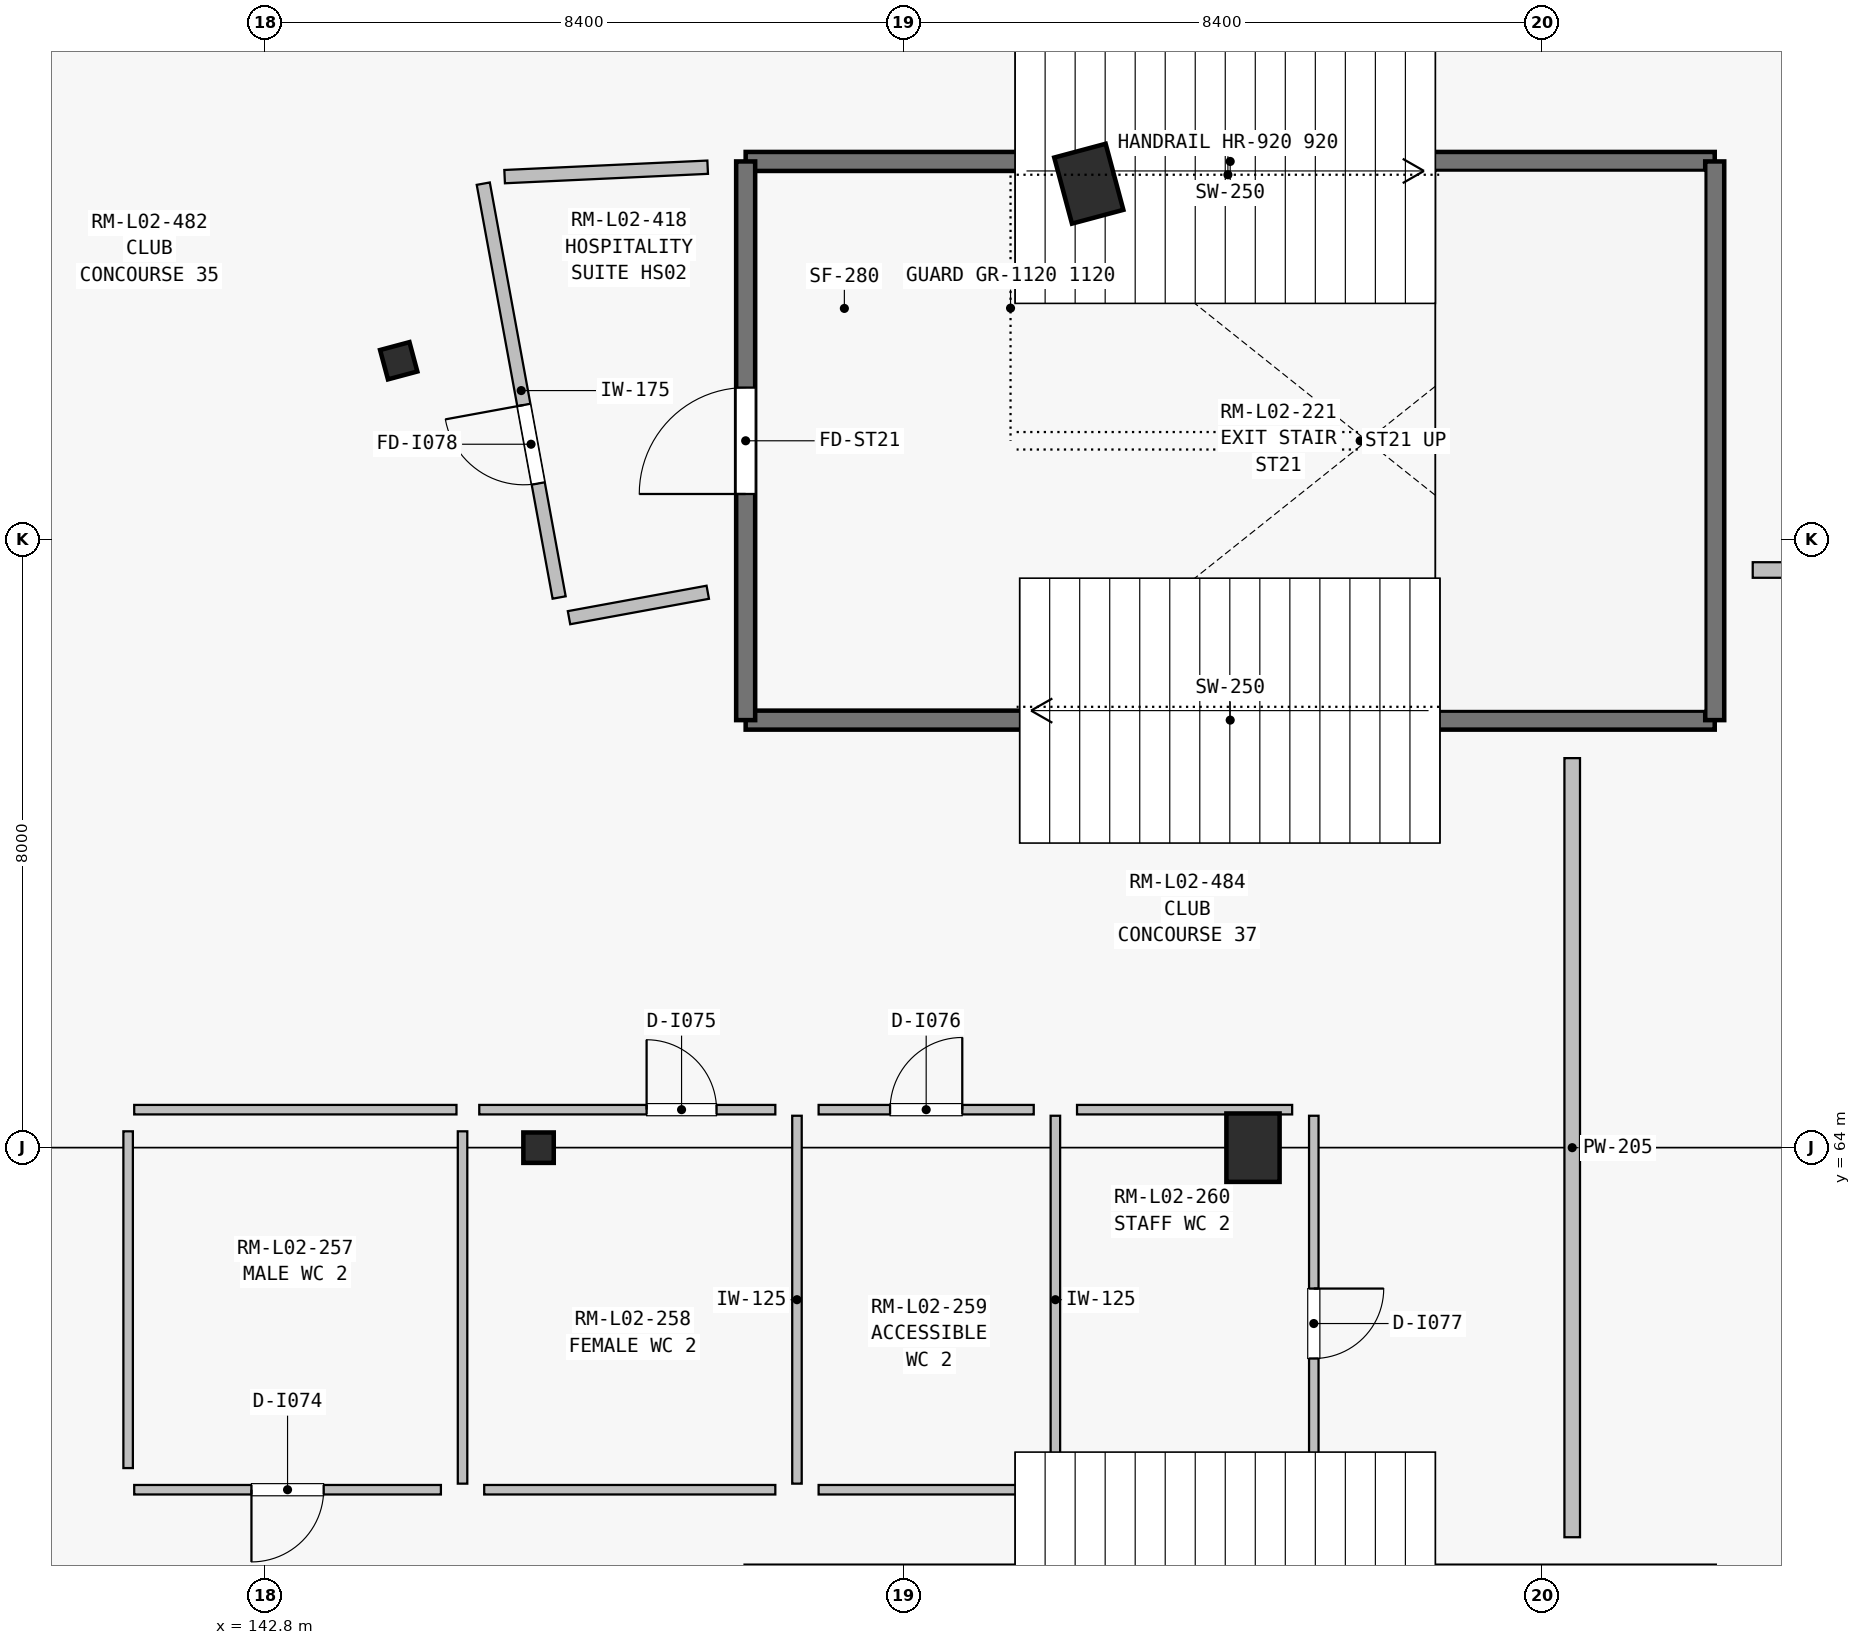
"""IFC4 building model, lengths in metres.
Left out: names, types, materials, properties, quantities, classifications, styles, units other than length and angle.
Written with IfcOpenShell. Run it as: python <this file> out.ifc"""

import sys

from ifc_helpers import new_model, si_unit, direction, frame, frame_2d, origin, origin_2d, place, context, subcontext, project, spatial, rectangle, i_section, extrude, element, fill, save


model = new_model("IFC4")
c1 = context("Model", 3, precision=1e-05, world=origin(), true_north=direction((0.0, 1.0)))
c2 = subcontext(c1, "Body", "Model", "MODEL_VIEW")
j1 = project(units=[si_unit("LENGTHUNIT", "METRE"), si_unit("PLANEANGLEUNIT", "RADIAN")], contexts=[c1])
p1 = place(None, origin())
s1 = spatial("IfcSite", under=j1, at=p1, CompositionType="ELEMENT")
p2 = place(p1, origin())
s2 = spatial("IfcBuilding", under=s1, at=p2, CompositionType="ELEMENT")
p3 = place(p2, frame((0.0, 0.0, 9.9)))
s3 = spatial("IfcBuildingStorey", under=s2, at=p3, CompositionType="ELEMENT", Elevation=9.9)
for number, where, z_axis, x_axis in (
    (1, (146.4, 64.0, 0.0), (0.0, 0.0, 1.0), (1.0, 0.0, 0.0)),
    (2, (144.56, 74.353, 0.0), (0.0, 0.0, 1.0), (0.966, 0.259, 0.0)),
):
    element("IfcColumn", number, at=place(p3, frame(where, z_axis=z_axis, x_axis=x_axis)), inside=s3, PredefinedType="COLUMN", context=c2, shape_type="SweptSolid", body=[
        extrude(i_section(OverallWidth=0.4, OverallDepth=0.4, WebThickness=0.018, FlangeThickness=0.032, at=origin_2d()), origin(), (0.0, 0.0, 1.0), 4.5),
    ])
for number, where, z_axis, x_axis in (
    (3, (155.8, 64.0, 0.0), (0.0, 0.0, 1.0), (1.0, 0.0, 0.0)),
    (4, (153.64, 76.682, 0.0), (0.0, 0.0, 1.0), (0.966, 0.259, 0.0)),
):
    element("IfcColumn", number, at=place(p3, frame(where, z_axis=z_axis, x_axis=x_axis)), inside=s3, PredefinedType="COLUMN", context=c2, shape_type="SweptSolid", body=[
        extrude(rectangle(XDim=0.7, YDim=0.9, at=origin_2d()), origin(), (0.0, 0.0, 1.0), 4.5),
    ])
for number, where, z_axis, x_axis in (
    (5, (149.125, 69.625, 0.0), (0.0, 0.0, 1.0), (1.0, 0.0, 0.0)),
    (6, (149.125, 76.975, 0.0), (0.0, 0.0, 1.0), (1.0, 0.0, 0.0)),
):
    element("IfcWall", number, at=place(p3, frame(where, z_axis=z_axis, x_axis=x_axis)), inside=s3, PredefinedType="SHEAR", context=c2, shape_type="SweptSolid", body=[
        extrude(rectangle(XDim=12.75, YDim=0.25, at=frame_2d((6.375, 0.0))), origin(), (0.0, 0.0, 1.0), 4.5),
    ])
p4 = place(p3, frame((149.125, 69.625, 0.0), z_axis=(0.0, 0.0, 1.0), x_axis=(0.0, 1.0, 0.0)))
e7 = element("IfcWall", 7, at=p4, inside=s3, PredefinedType="SHEAR", context=c2, shape_type="SweptSolid", body=[
    extrude(rectangle(XDim=7.35, YDim=0.25, at=frame_2d((3.675, 0.0))), origin(), (0.0, 0.0, 1.0), 4.5),
])
p5 = place(p4, frame((2.975, 0.0, 0.0)))
e8 = element("IfcOpeningElement", 8, at=p5, cuts=e7, PredefinedType="OPENING", context=c2, shape_type="SweptSolid", body=[
    extrude(rectangle(XDim=1.4, YDim=2.2, at=frame_2d((0.7, 1.1))), frame((0.0, 0.135, 0.0), z_axis=(0.0, -1.0, 0.0), x_axis=(1.0, 0.0, 0.0)), (0.0, 0.0, 1.0), 0.27),
])
p6 = place(p3, frame((161.875, 69.625, 0.0), z_axis=(0.0, 0.0, 1.0), x_axis=(0.0, 1.0, 0.0)))
e9 = element("IfcWall", 9, at=p6, inside=s3, PredefinedType="SHEAR", context=c2, shape_type="SweptSolid", body=[
    extrude(rectangle(XDim=7.35, YDim=0.25, at=frame_2d((3.675, 0.0))), origin(), (0.0, 0.0, 1.0), 4.5),
])
p7 = place(p3, frame((141.08, 64.5, 0.0), z_axis=(0.0, 0.0, 1.0), x_axis=(1.0, 0.0, 0.0)))
e10 = element("IfcWall", 10, at=p7, inside=s3, PredefinedType="PARTITIONING", context=c2, shape_type="SweptSolid", body=[
    extrude(rectangle(XDim=4.24, YDim=0.125, at=frame_2d((2.12, 0.0))), origin(), (0.0, 0.0, 1.0), 4.2),
])
p8 = place(p3, frame((145.4, 64.215, 0.0), z_axis=(0.0, 0.0, 1.0), x_axis=(0.0, -1.0, 0.0)))
e11 = element("IfcWall", 11, at=p8, inside=s3, PredefinedType="PARTITIONING", context=c2, shape_type="SweptSolid", body=[
    extrude(rectangle(XDim=4.635, YDim=0.125, at=frame_2d((2.317, 0.0))), origin(), (0.0, 0.0, 1.0), 3.245),
])
p9 = place(p3, frame((145.115, 59.5, 0.0), z_axis=(0.0, 0.0, 1.0), x_axis=(-1.0, 0.0, 0.0)))
e12 = element("IfcWall", 12, at=p9, inside=s3, PredefinedType="PARTITIONING", context=c2, shape_type="SweptSolid", body=[
    extrude(rectangle(XDim=4.035, YDim=0.125, at=frame_2d((2.018, 0.0))), origin(), (0.0, 0.0, 1.0), 4.18),
])
p10 = place(p9, frame((1.542, 0.0, 0.0)))
e13 = element("IfcOpeningElement", 13, at=p10, cuts=e12, PredefinedType="OPENING", context=c2, shape_type="SweptSolid", body=[
    extrude(rectangle(XDim=0.95, YDim=2.1, at=frame_2d((0.475, 1.05))), frame((0.0, 0.073, 0.0), z_axis=(0.0, -1.0, 0.0), x_axis=(1.0, 0.0, 0.0)), (0.0, 0.0, 1.0), 0.145),
])
p11 = place(p3, frame((141.0, 59.785, 0.0), z_axis=(0.0, 0.0, 1.0), x_axis=(0.0, 1.0, 0.0)))
e14 = element("IfcWall", 14, at=p11, inside=s3, PredefinedType="PARTITIONING", context=c2, shape_type="SweptSolid", body=[
    extrude(rectangle(XDim=4.43, YDim=0.125, at=frame_2d((2.215, 0.0))), origin(), (0.0, 0.0, 1.0), 4.18),
])
p12 = place(p3, frame((149.8, 64.42, 0.0), z_axis=(0.0, 0.0, 1.0), x_axis=(0.0, -1.0, 0.0)))
e15 = element("IfcWall", 15, at=p12, inside=s3, PredefinedType="PARTITIONING", context=c2, shape_type="SweptSolid", body=[
    extrude(rectangle(XDim=4.84, YDim=0.125, at=frame_2d((2.42, 0.0))), origin(), (0.0, 0.0, 1.0), 3.627),
])
p13 = place(p3, frame((149.515, 59.5, 0.0), z_axis=(0.0, 0.0, 1.0), x_axis=(-1.0, 0.0, 0.0)))
e16 = element("IfcWall", 16, at=p13, inside=s3, PredefinedType="PARTITIONING", context=c2, shape_type="SweptSolid", body=[
    extrude(rectangle(XDim=3.83, YDim=0.125, at=frame_2d((1.915, 0.0))), origin(), (0.0, 0.0, 1.0), 3.245),
])
p14 = place(p3, frame((145.62, 64.5, 0.0), z_axis=(0.0, 0.0, 1.0), x_axis=(1.0, 0.0, 0.0)))
e17 = element("IfcWall", 17, at=p14, inside=s3, PredefinedType="PARTITIONING", context=c2, shape_type="SweptSolid", body=[
    extrude(rectangle(XDim=3.895, YDim=0.125, at=frame_2d((1.948, 0.0))), origin(), (0.0, 0.0, 1.0), 3.245),
])
p15 = place(p14, frame((2.202, 0.0, 0.0)))
e18 = element("IfcOpeningElement", 18, at=p15, cuts=e17, PredefinedType="OPENING", context=c2, shape_type="SweptSolid", body=[
    extrude(rectangle(XDim=0.92, YDim=2.1, at=frame_2d((0.46, 1.05))), frame((0.0, 0.073, 0.0), z_axis=(0.0, -1.0, 0.0), x_axis=(1.0, 0.0, 0.0)), (0.0, 0.0, 1.0), 0.145),
])
p16 = place(p3, frame((153.2, 64.42, 0.0), z_axis=(0.0, 0.0, 1.0), x_axis=(0.0, -1.0, 0.0)))
e19 = element("IfcWall", 19, at=p16, inside=s3, PredefinedType="PARTITIONING", context=c2, shape_type="SweptSolid", body=[
    extrude(rectangle(XDim=4.84, YDim=0.125, at=frame_2d((2.42, 0.0))), origin(), (0.0, 0.0, 1.0), 3.627),
])
p17 = place(p3, frame((152.915, 59.5, 0.0), z_axis=(0.0, 0.0, 1.0), x_axis=(-1.0, 0.0, 0.0)))
e20 = element("IfcWall", 20, at=p17, inside=s3, PredefinedType="PARTITIONING", context=c2, shape_type="SweptSolid", body=[
    extrude(rectangle(XDim=2.831, YDim=0.125, at=frame_2d((1.415, 0.0))), origin(), (0.0, 0.0, 1.0), 4.18),
])
p18 = place(p3, frame((150.085, 64.5, 0.0), z_axis=(0.0, 0.0, 1.0), x_axis=(1.0, 0.0, 0.0)))
e21 = element("IfcWall", 21, at=p18, inside=s3, PredefinedType="PARTITIONING", context=c2, shape_type="SweptSolid", body=[
    extrude(rectangle(XDim=2.831, YDim=0.125, at=frame_2d((1.415, 0.0))), origin(), (0.0, 0.0, 1.0), 4.2),
])
p19 = place(p18, frame((0.94, 0.0, 0.0)))
e22 = element("IfcOpeningElement", 22, at=p19, cuts=e21, PredefinedType="OPENING", context=c2, shape_type="SweptSolid", body=[
    extrude(rectangle(XDim=0.95, YDim=2.1, at=frame_2d((0.475, 1.05))), frame((0.0, 0.073, 0.0), z_axis=(0.0, -1.0, 0.0), x_axis=(1.0, 0.0, 0.0)), (0.0, 0.0, 1.0), 0.145),
])
p20 = place(p3, frame((156.6, 64.42, 0.0), z_axis=(0.0, 0.0, 1.0), x_axis=(0.0, -1.0, 0.0)))
e23 = element("IfcWall", 23, at=p20, inside=s3, PredefinedType="PARTITIONING", context=c2, shape_type="SweptSolid", body=[
    extrude(rectangle(XDim=4.84, YDim=0.125, at=frame_2d((2.42, 0.0))), origin(), (0.0, 0.0, 1.0), 3.627),
])
p21 = place(p20, frame((2.274, 0.0, 0.0)))
e24 = element("IfcOpeningElement", 24, at=p21, cuts=e23, PredefinedType="OPENING", context=c2, shape_type="SweptSolid", body=[
    extrude(rectangle(XDim=0.92, YDim=2.1, at=frame_2d((0.46, 1.05))), frame((0.0, 0.073, 0.0), z_axis=(0.0, -1.0, 0.0), x_axis=(1.0, 0.0, 0.0)), (0.0, 0.0, 1.0), 0.145),
])
p22 = place(p3, frame((156.315, 59.5, 0.0), z_axis=(0.0, 0.0, 1.0), x_axis=(-1.0, 0.0, 0.0)))
e25 = element("IfcWall", 25, at=p22, inside=s3, PredefinedType="PARTITIONING", context=c2, shape_type="SweptSolid", body=[
    extrude(rectangle(XDim=2.83, YDim=0.125, at=frame_2d((1.415, 0.0))), origin(), (0.0, 0.0, 1.0), 4.18),
])
p23 = place(p3, frame((153.485, 64.5, 0.0), z_axis=(0.0, 0.0, 1.0), x_axis=(1.0, 0.0, 0.0)))
e26 = element("IfcWall", 26, at=p23, inside=s3, PredefinedType="PARTITIONING", context=c2, shape_type="SweptSolid", body=[
    extrude(rectangle(XDim=2.83, YDim=0.125, at=frame_2d((1.415, 0.0))), origin(), (0.0, 0.0, 1.0), 4.2),
])
p24 = place(p3, frame((148.626, 71.307, 0.0), z_axis=(0.0, 0.0, 1.0), x_axis=(-0.983601501443, -0.180355444494, 0.0)))
e27 = element("IfcWall", 27, at=p24, inside=s3, PredefinedType="PARTITIONING", context=c2, shape_type="SweptSolid", body=[
    extrude(rectangle(XDim=1.856, YDim=0.175, at=frame_2d((0.928, 0.0))), origin(), (0.0, 0.0, 1.0), 4.2),
])
p25 = place(p3, frame((146.671, 71.238, 0.0), z_axis=(0.0, 0.0, 1.0), x_axis=(-0.180348493387, 0.983602775989, 0.0)))
e28 = element("IfcWall", 28, at=p25, inside=s3, PredefinedType="PARTITIONING", context=c2, shape_type="SweptSolid", body=[
    extrude(rectangle(XDim=5.535, YDim=0.175, at=frame_2d((2.768, 0.0))), origin(), (0.0, 0.0, 1.0), 4.2),
])
p26 = place(p25, frame((1.525, 0.0, 0.0)))
e29 = element("IfcOpeningElement", 29, at=p26, cuts=e28, PredefinedType="OPENING", context=c2, shape_type="SweptSolid", body=[
    extrude(rectangle(XDim=1.05, YDim=2.25, at=frame_2d((0.525, 1.125))), frame((0.0, 0.097, 0.0), z_axis=(0.0, -1.0, 0.0), x_axis=(1.0, 0.0, 0.0)), (0.0, 0.0, 1.0), 0.195),
])
p27 = place(p3, frame((145.954, 76.775, 0.0), z_axis=(0.0, 0.0, 1.0), x_axis=(0.998919790454, 0.046467754829, 0.0)))
e30 = element("IfcWall", 30, at=p27, inside=s3, PredefinedType="PARTITIONING", context=c2, shape_type="SweptSolid", body=[
    extrude(rectangle(XDim=2.674, YDim=0.175, at=frame_2d((1.337, 0.0))), origin(), (0.0, 0.0, 1.0), 4.2),
])
p28 = place(p3, frame((162.375, 71.6, 0.0), z_axis=(0.0, 0.0, 1.0), x_axis=(1.0, 0.0, 0.0)))
e31 = element("IfcWall", 31, at=p28, inside=s3, PredefinedType="SOLIDWALL", context=c2, shape_type="SweptSolid", body=[
    extrude(rectangle(XDim=10.812, YDim=0.205, at=frame_2d((5.406, 0.0))), origin(), (0.0, 0.0, 1.0), 3.245),
])
p29 = place(p28, frame((4.606, 0.0, 0.0)))
e32 = element("IfcOpeningElement", 32, at=p29, cuts=e31, PredefinedType="OPENING", context=c2, shape_type="SweptSolid", body=[
    extrude(rectangle(XDim=1.6, YDim=2.35, at=frame_2d((0.8, 1.175))), frame((0.0, 0.113, 0.0), z_axis=(0.0, -1.0, 0.0), x_axis=(1.0, 0.0, 0.0)), (0.0, 0.0, 1.0), 0.225),
])
p30 = place(p3, frame((160.0, 58.875, 0.0), z_axis=(0.0, 0.0, 1.0), x_axis=(0.0, 1.0, 0.0)))
e33 = element("IfcWall", 33, at=p30, inside=s3, PredefinedType="SOLIDWALL", context=c2, shape_type="SweptSolid", body=[
    extrude(rectangle(XDim=10.25, YDim=0.205, at=frame_2d((5.125, 0.0))), origin(), (0.0, 0.0, 1.0), 3.627),
])
p31 = place(p5, origin())
e34 = element("IfcDoor", 34, at=p31, inside=s3, OperationType="SINGLE_SWING_LEFT", PredefinedType="DOOR", context=c2, shape_type="SweptSolid", body=[
    extrude(rectangle(XDim=1.4, YDim=2.2, at=frame_2d((0.7, 1.1))), frame((0.0, 0.025, 0.0), z_axis=(0.0, -1.0, 0.0), x_axis=(1.0, 0.0, 0.0)), (0.0, 0.0, 1.0), 0.05),
])
fill(e8, e34)
p32 = place(p10, origin())
e35 = element("IfcDoor", 35, at=p32, inside=s3, OperationType="SINGLE_SWING_RIGHT", PredefinedType="DOOR", context=c2, shape_type="SweptSolid", body=[
    extrude(rectangle(XDim=0.95, YDim=2.1, at=frame_2d((0.475, 1.05))), frame((0.0, 0.025, 0.0), z_axis=(0.0, -1.0, 0.0), x_axis=(1.0, 0.0, 0.0)), (0.0, 0.0, 1.0), 0.05),
])
fill(e13, e35)
p33 = place(p15, origin())
e36 = element("IfcDoor", 36, at=p33, inside=s3, OperationType="SINGLE_SWING_LEFT", PredefinedType="DOOR", context=c2, shape_type="SweptSolid", body=[
    extrude(rectangle(XDim=0.92, YDim=2.1, at=frame_2d((0.46, 1.05))), frame((0.0, 0.025, 0.0), z_axis=(0.0, -1.0, 0.0), x_axis=(1.0, 0.0, 0.0)), (0.0, 0.0, 1.0), 0.05),
])
fill(e18, e36)
p34 = place(p19, origin())
e37 = element("IfcDoor", 37, at=p34, inside=s3, OperationType="SINGLE_SWING_RIGHT", PredefinedType="DOOR", context=c2, shape_type="SweptSolid", body=[
    extrude(rectangle(XDim=0.95, YDim=2.1, at=frame_2d((0.475, 1.05))), frame((0.0, 0.025, 0.0), z_axis=(0.0, -1.0, 0.0), x_axis=(1.0, 0.0, 0.0)), (0.0, 0.0, 1.0), 0.05),
])
fill(e22, e37)
p35 = place(p21, origin())
e38 = element("IfcDoor", 38, at=p35, inside=s3, OperationType="SINGLE_SWING_LEFT", PredefinedType="DOOR", context=c2, shape_type="SweptSolid", body=[
    extrude(rectangle(XDim=0.92, YDim=2.1, at=frame_2d((0.46, 1.05))), frame((0.0, 0.025, 0.0), z_axis=(0.0, -1.0, 0.0), x_axis=(1.0, 0.0, 0.0)), (0.0, 0.0, 1.0), 0.05),
])
fill(e24, e38)
p36 = place(p26, origin())
e39 = element("IfcDoor", 39, at=p36, inside=s3, OperationType="SINGLE_SWING_RIGHT", PredefinedType="DOOR", context=c2, shape_type="SweptSolid", body=[
    extrude(rectangle(XDim=1.05, YDim=2.25, at=frame_2d((0.525, 1.125))), frame((0.0, 0.025, 0.0), z_axis=(0.0, -1.0, 0.0), x_axis=(1.0, 0.0, 0.0)), (0.0, 0.0, 1.0), 0.05),
])
fill(e29, e39)
save(model, sys.argv[1])
